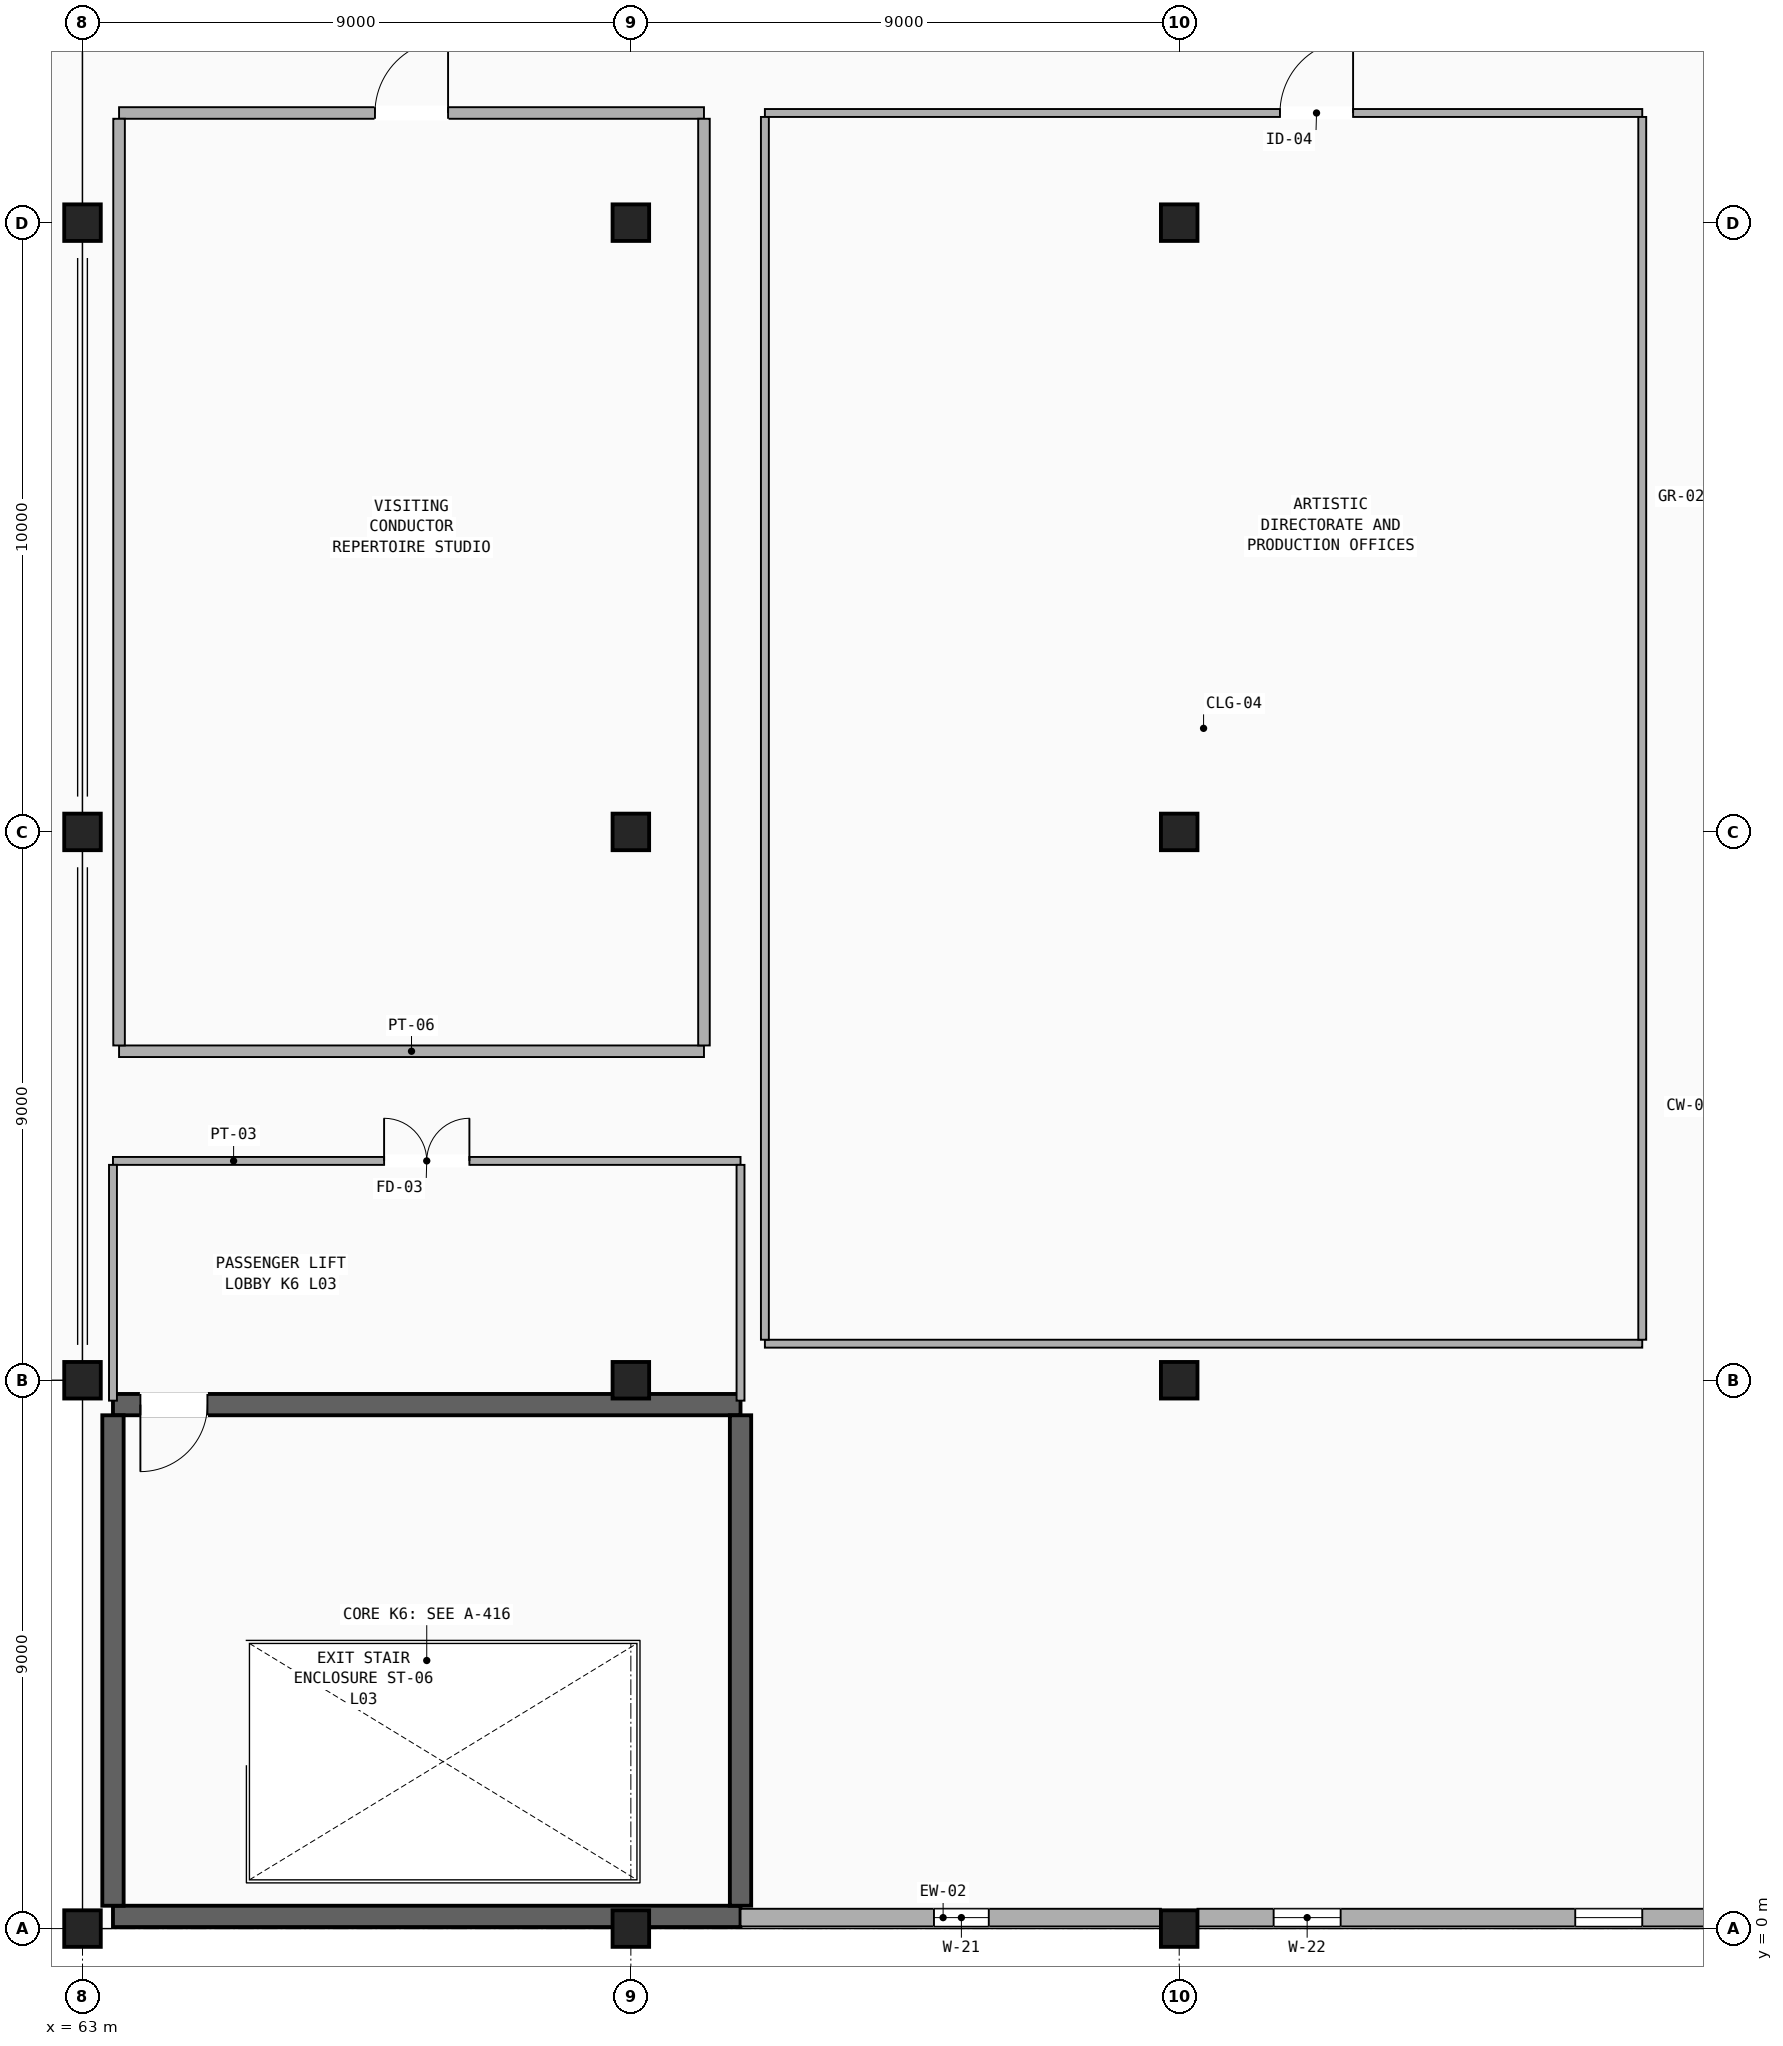
"""IFC4 building model, lengths in metres.
Left out: names, types, materials, properties, quantities, classifications, styles, units other than length and angle.
Written with IfcOpenShell. Run it as: python <this file> out.ifc"""

import sys

from ifc_helpers import new_model, si_unit, direction, frame, frame_2d, origin, origin_2d, place, context, subcontext, project, spatial, rectangle, extrude, element, fill, save


model = new_model("IFC4")
c1 = context("Model", 3, precision=1e-05, world=origin(), true_north=direction((0.0, 1.0)))
c2 = subcontext(c1, "Body", "Model", "MODEL_VIEW")
j1 = project(units=[si_unit("LENGTHUNIT", "METRE"), si_unit("PLANEANGLEUNIT", "RADIAN")], contexts=[c1])
p1 = place(None, origin())
s1 = spatial("IfcSite", under=j1, at=p1, CompositionType="ELEMENT")
p2 = place(p1, origin())
s2 = spatial("IfcBuilding", under=s1, at=p2, CompositionType="ELEMENT")
p3 = place(p2, frame((0.0, 0.0, 13.6)))
s3 = spatial("IfcBuildingStorey", under=s2, at=p3, CompositionType="ELEMENT", Elevation=13.6)
for number, where, z_axis, x_axis in (
    (1, (81.0, 0.0, 0.0), (0.0, 0.0, 1.0), (1.0, 0.0, 0.0)),
    (2, (81.0, 9.0, 0.0), (0.0, 0.0, 1.0), (1.0, 0.0, 0.0)),
    (3, (81.0, 18.0, 0.0), (0.0, 0.0, 1.0), (1.0, 0.0, 0.0)),
    (4, (81.0, 28.0, 0.0), (0.0, 0.0, 1.0), (1.0, 0.0, 0.0)),
    (5, (63.0, 0.0, 0.0), (0.0, 0.0, 1.0), (1.0, 0.0, 0.0)),
    (6, (63.0, 9.0, 0.0), (0.0, 0.0, 1.0), (1.0, 0.0, 0.0)),
    (7, (63.0, 18.0, 0.0), (0.0, 0.0, 1.0), (1.0, 0.0, 0.0)),
    (8, (63.0, 28.0, 0.0), (0.0, 0.0, 1.0), (1.0, 0.0, 0.0)),
    (9, (72.0, 0.0, 0.0), (0.0, 0.0, 1.0), (1.0, 0.0, 0.0)),
    (10, (72.0, 9.0, 0.0), (0.0, 0.0, 1.0), (1.0, 0.0, 0.0)),
    (11, (72.0, 18.0, 0.0), (0.0, 0.0, 1.0), (1.0, 0.0, 0.0)),
    (12, (72.0, 28.0, 0.0), (0.0, 0.0, 1.0), (1.0, 0.0, 0.0)),
):
    element("IfcColumn", number, at=place(p3, frame(where, z_axis=z_axis, x_axis=x_axis)), inside=s3, PredefinedType="COLUMN", context=c2, shape_type="SweptSolid", body=[
        extrude(rectangle(XDim=0.6, YDim=0.6, at=origin_2d()), origin(), (0.0, 0.0, 1.0), 4.08),
    ])
p4 = place(p3, frame((63.5, 0.2, 0.0), z_axis=(0.0, 0.0, 1.0), x_axis=(1.0, 0.0, 0.0)))
e13 = element("IfcWall", 13, at=p4, inside=s3, PredefinedType="SHEAR", context=c2, shape_type="SweptSolid", body=[
    extrude(rectangle(XDim=10.3, YDim=0.35, at=frame_2d((5.15, 0.0))), origin(), (0.0, 0.0, 1.0), 4.08),
])
p5 = place(p3, frame((63.5, 8.6, 0.0), z_axis=(0.0, 0.0, 1.0), x_axis=(1.0, 0.0, 0.0)))
e14 = element("IfcWall", 14, at=p5, inside=s3, PredefinedType="SHEAR", context=c2, shape_type="SweptSolid", body=[
    extrude(rectangle(XDim=10.3, YDim=0.35, at=frame_2d((5.15, 0.0))), origin(), (0.0, 0.0, 1.0), 4.08),
])
p6 = place(p5, frame((0.45, 0.0, 0.0)))
e15 = element("IfcOpeningElement", 15, at=p6, cuts=e14, PredefinedType="OPENING", context=c2, shape_type="SweptSolid", body=[
    extrude(rectangle(XDim=1.1, YDim=2.2, at=frame_2d((0.55, 1.1))), frame((0.0, 0.185, 0.0), z_axis=(0.0, -1.0, 0.0), x_axis=(1.0, 0.0, 0.0)), (0.0, 0.0, 1.0), 0.37),
])
for number, where, z_axis, x_axis in (
    (16, (63.5, 0.375, 0.0), (0.0, 0.0, 1.0), (0.0, 1.0, 0.0)),
    (17, (73.8, 0.375, 0.0), (0.0, 0.0, 1.0), (0.0, 1.0, 0.0)),
):
    element("IfcWall", number, at=place(p3, frame(where, z_axis=z_axis, x_axis=x_axis)), inside=s3, PredefinedType="SHEAR", context=c2, shape_type="SweptSolid", body=[
        extrude(rectangle(XDim=8.05, YDim=0.35, at=frame_2d((4.025, 0.0))), origin(), (0.0, 0.0, 1.0), 4.08),
    ])
p7 = place(p3, frame((73.8, 0.18, 0.0), z_axis=(0.0, 0.0, 1.0), x_axis=(1.0, 0.0, 0.0)))
e18 = element("IfcWall", 18, at=p7, inside=s3, PredefinedType="STANDARD", context=c2, shape_type="SweptSolid", body=[
    extrude(rectangle(XDim=6.9, YDim=0.29, at=frame_2d((3.45, 0.0))), origin(), (0.0, 0.0, 1.0), 3.277),
])
p8 = place(p7, frame((3.175, 0.0, 0.9)))
e19 = element("IfcOpeningElement", 19, at=p8, cuts=e18, PredefinedType="OPENING", context=c2, shape_type="SweptSolid", body=[
    extrude(rectangle(XDim=0.9, YDim=1.5, at=frame_2d((0.45, 0.75))), frame((0.0, 0.155, 0.0), z_axis=(0.0, -1.0, 0.0), x_axis=(1.0, 0.0, 0.0)), (0.0, 0.0, 1.0), 0.31),
])
p9 = place(p3, frame((81.3, 0.18, 0.0), z_axis=(0.0, 0.0, 1.0), x_axis=(1.0, 0.0, 0.0)))
e20 = element("IfcWall", 20, at=p9, inside=s3, PredefinedType="STANDARD", context=c2, shape_type="SweptSolid", body=[
    extrude(rectangle(XDim=8.4, YDim=0.29, at=frame_2d((4.2, 0.0))), origin(), (0.0, 0.0, 1.0), 3.277),
])
p10 = place(p9, frame((1.25, 0.0, 0.9)))
e21 = element("IfcOpeningElement", 21, at=p10, cuts=e20, PredefinedType="OPENING", context=c2, shape_type="SweptSolid", body=[
    extrude(rectangle(XDim=1.1, YDim=2.0, at=frame_2d((0.55, 1.0))), frame((0.0, 0.155, 0.0), z_axis=(0.0, -1.0, 0.0), x_axis=(1.0, 0.0, 0.0)), (0.0, 0.0, 1.0), 0.31),
])
p11 = place(p9, frame((6.2, 0.0, 0.9)))
e22 = element("IfcOpeningElement", 22, at=p11, cuts=e20, PredefinedType="OPENING", context=c2, shape_type="SweptSolid", body=[
    extrude(rectangle(XDim=1.1, YDim=2.0, at=frame_2d((0.55, 1.0))), frame((0.0, 0.155, 0.0), z_axis=(0.0, -1.0, 0.0), x_axis=(1.0, 0.0, 0.0)), (0.0, 0.0, 1.0), 0.31),
])
p12 = place(p3, frame((63.5, 12.6, 0.0), z_axis=(0.0, 0.0, 1.0), x_axis=(1.0, 0.0, 0.0)))
e23 = element("IfcWall", 23, at=p12, inside=s3, PredefinedType="PARTITIONING", context=c2, shape_type="SweptSolid", body=[
    extrude(rectangle(XDim=10.3, YDim=0.13, at=frame_2d((5.15, 0.0))), origin(), (0.0, 0.0, 1.0), 3.84),
])
p13 = place(p12, frame((4.45, 0.0, 0.0)))
e24 = element("IfcOpeningElement", 24, at=p13, cuts=e23, PredefinedType="OPENING", context=c2, shape_type="SweptSolid", body=[
    extrude(rectangle(XDim=1.4, YDim=2.2, at=frame_2d((0.7, 1.1))), frame((0.0, 0.075, 0.0), z_axis=(0.0, -1.0, 0.0), x_axis=(1.0, 0.0, 0.0)), (0.0, 0.0, 1.0), 0.15),
])
for number, where, z_axis, x_axis in (
    (25, (63.5, 8.665, 0.0), (0.0, 0.0, 1.0), (0.0, 1.0, 0.0)),
    (26, (73.8, 8.665, 0.0), (0.0, 0.0, 1.0), (0.0, 1.0, 0.0)),
):
    element("IfcWall", number, at=place(p3, frame(where, z_axis=z_axis, x_axis=x_axis)), inside=s3, PredefinedType="PARTITIONING", context=c2, shape_type="SweptSolid", body=[
        extrude(rectangle(XDim=3.87, YDim=0.13, at=frame_2d((1.935, 0.0))), origin(), (0.0, 0.0, 1.0), 3.277),
    ])
p14 = place(p3, frame((74.2, 9.6, 0.0), z_axis=(0.0, 0.0, 1.0), x_axis=(1.0, 0.0, 0.0)))
e27 = element("IfcWall", 27, at=p14, inside=s3, PredefinedType="PARTITIONING", context=c2, shape_type="SweptSolid", body=[
    extrude(rectangle(XDim=14.4, YDim=0.13, at=frame_2d((7.2, 0.0))), origin(), (0.0, 0.0, 1.0), 3.84),
])
p15 = place(p3, frame((74.2, 29.8, 0.0), z_axis=(0.0, 0.0, 1.0), x_axis=(1.0, 0.0, 0.0)))
e28 = element("IfcWall", 28, at=p15, inside=s3, PredefinedType="PARTITIONING", context=c2, shape_type="SweptSolid", body=[
    extrude(rectangle(XDim=14.4, YDim=0.13, at=frame_2d((7.2, 0.0))), origin(), (0.0, 0.0, 1.0), 3.277),
])
p16 = place(p15, frame((8.454, 0.0, 0.0)))
e29 = element("IfcOpeningElement", 29, at=p16, cuts=e28, PredefinedType="OPENING", context=c2, shape_type="SweptSolid", body=[
    extrude(rectangle(XDim=1.2, YDim=2.2, at=frame_2d((0.6, 1.1))), frame((0.0, 0.075, 0.0), z_axis=(0.0, -1.0, 0.0), x_axis=(1.0, 0.0, 0.0)), (0.0, 0.0, 1.0), 0.15),
])
for number, where, z_axis, x_axis in (
    (30, (74.2, 9.665, 0.0), (0.0, 0.0, 1.0), (0.0, 1.0, 0.0)),
    (31, (88.6, 9.665, 0.0), (0.0, 0.0, 1.0), (0.0, 1.0, 0.0)),
):
    element("IfcWall", number, at=place(p3, frame(where, z_axis=z_axis, x_axis=x_axis)), inside=s3, PredefinedType="PARTITIONING", context=c2, shape_type="SweptSolid", body=[
        extrude(rectangle(XDim=20.07, YDim=0.13, at=frame_2d((10.035, 0.0))), origin(), (0.0, 0.0, 1.0), 3.277),
    ])
p17 = place(p3, frame((63.6, 14.4, 0.0), z_axis=(0.0, 0.0, 1.0), x_axis=(1.0, 0.0, 0.0)))
e32 = element("IfcWall", 32, at=p17, inside=s3, PredefinedType="PARTITIONING", context=c2, shape_type="SweptSolid", body=[
    extrude(rectangle(XDim=9.6, YDim=0.19, at=frame_2d((4.8, 0.0))), origin(), (0.0, 0.0, 1.0), 3.84),
])
p18 = place(p3, frame((63.6, 29.8, 0.0), z_axis=(0.0, 0.0, 1.0), x_axis=(1.0, 0.0, 0.0)))
e33 = element("IfcWall", 33, at=p18, inside=s3, PredefinedType="PARTITIONING", context=c2, shape_type="SweptSolid", body=[
    extrude(rectangle(XDim=9.6, YDim=0.19, at=frame_2d((4.8, 0.0))), origin(), (0.0, 0.0, 1.0), 3.277),
])
p19 = place(p18, frame((4.2, 0.0, 0.0)))
e34 = element("IfcOpeningElement", 34, at=p19, cuts=e33, PredefinedType="OPENING", context=c2, shape_type="SweptSolid", body=[
    extrude(rectangle(XDim=1.2, YDim=2.2, at=frame_2d((0.6, 1.1))), frame((0.0, 0.105, 0.0), z_axis=(0.0, -1.0, 0.0), x_axis=(1.0, 0.0, 0.0)), (0.0, 0.0, 1.0), 0.21),
])
for number, where, z_axis, x_axis in (
    (35, (63.6, 14.495, 0.0), (0.0, 0.0, 1.0), (0.0, 1.0, 0.0)),
    (36, (73.2, 14.495, 0.0), (0.0, 0.0, 1.0), (0.0, 1.0, 0.0)),
):
    element("IfcWall", number, at=place(p3, frame(where, z_axis=z_axis, x_axis=x_axis)), inside=s3, PredefinedType="PARTITIONING", context=c2, shape_type="SweptSolid", body=[
        extrude(rectangle(XDim=15.21, YDim=0.19, at=frame_2d((7.605, 0.0))), origin(), (0.0, 0.0, 1.0), 3.277),
    ])
p20 = place(p8, origin())
e37 = element("IfcWindow", 37, at=p20, inside=s3, PartitioningType="SINGLE_PANEL", PredefinedType="WINDOW", context=c2, shape_type="SweptSolid", body=[
    extrude(rectangle(XDim=0.9, YDim=1.5, at=frame_2d((0.45, 0.75))), frame((0.0, 0.03, 0.0), z_axis=(0.0, -1.0, 0.0), x_axis=(1.0, 0.0, 0.0)), (0.0, 0.0, 1.0), 0.06),
])
fill(e19, e37)
p21 = place(p10, origin())
e38 = element("IfcWindow", 38, at=p21, inside=s3, PartitioningType="SINGLE_PANEL", PredefinedType="WINDOW", context=c2, shape_type="SweptSolid", body=[
    extrude(rectangle(XDim=1.1, YDim=2.0, at=frame_2d((0.55, 1.0))), frame((0.0, 0.03, 0.0), z_axis=(0.0, -1.0, 0.0), x_axis=(1.0, 0.0, 0.0)), (0.0, 0.0, 1.0), 0.06),
])
fill(e21, e38)
p22 = place(p11, origin())
e39 = element("IfcWindow", 39, at=p22, inside=s3, PartitioningType="SINGLE_PANEL", PredefinedType="WINDOW", context=c2, shape_type="SweptSolid", body=[
    extrude(rectangle(XDim=1.1, YDim=2.0, at=frame_2d((0.55, 1.0))), frame((0.0, 0.03, 0.0), z_axis=(0.0, -1.0, 0.0), x_axis=(1.0, 0.0, 0.0)), (0.0, 0.0, 1.0), 0.06),
])
fill(e22, e39)
p23 = place(p6, frame((1.1, 0.0, 0.0), z_axis=(0.0, 0.0, 1.0), x_axis=(-1.0, 0.0, 0.0)))
e40 = element("IfcDoor", 40, at=p23, inside=s3, OperationType="SINGLE_SWING_RIGHT", PredefinedType="DOOR", context=c2, shape_type="SweptSolid", body=[
    extrude(rectangle(XDim=1.1, YDim=2.2, at=frame_2d((0.55, 1.1))), frame((0.0, 0.025, 0.0), z_axis=(0.0, -1.0, 0.0), x_axis=(1.0, 0.0, 0.0)), (0.0, 0.0, 1.0), 0.05),
])
fill(e15, e40)
p24 = place(p13, origin())
e41 = element("IfcDoor", 41, at=p24, inside=s3, OperationType="DOUBLE_DOOR_SINGLE_SWING", PredefinedType="DOOR", context=c2, shape_type="SweptSolid", body=[
    extrude(rectangle(XDim=1.4, YDim=2.2, at=frame_2d((0.7, 1.1))), frame((0.0, 0.025, 0.0), z_axis=(0.0, -1.0, 0.0), x_axis=(1.0, 0.0, 0.0)), (0.0, 0.0, 1.0), 0.05),
])
fill(e24, e41)
p25 = place(p16, origin())
e42 = element("IfcDoor", 42, at=p25, inside=s3, OperationType="SINGLE_SWING_RIGHT", PredefinedType="DOOR", context=c2, shape_type="SweptSolid", body=[
    extrude(rectangle(XDim=1.2, YDim=2.2, at=frame_2d((0.6, 1.1))), frame((0.0, 0.025, 0.0), z_axis=(0.0, -1.0, 0.0), x_axis=(1.0, 0.0, 0.0)), (0.0, 0.0, 1.0), 0.05),
])
fill(e29, e42)
p26 = place(p19, origin())
e43 = element("IfcDoor", 43, at=p26, inside=s3, OperationType="SINGLE_SWING_RIGHT", PredefinedType="DOOR", context=c2, shape_type="SweptSolid", body=[
    extrude(rectangle(XDim=1.2, YDim=2.2, at=frame_2d((0.6, 1.1))), frame((0.0, 0.025, 0.0), z_axis=(0.0, -1.0, 0.0), x_axis=(1.0, 0.0, 0.0)), (0.0, 0.0, 1.0), 0.05),
])
fill(e34, e43)
save(model, sys.argv[1])
